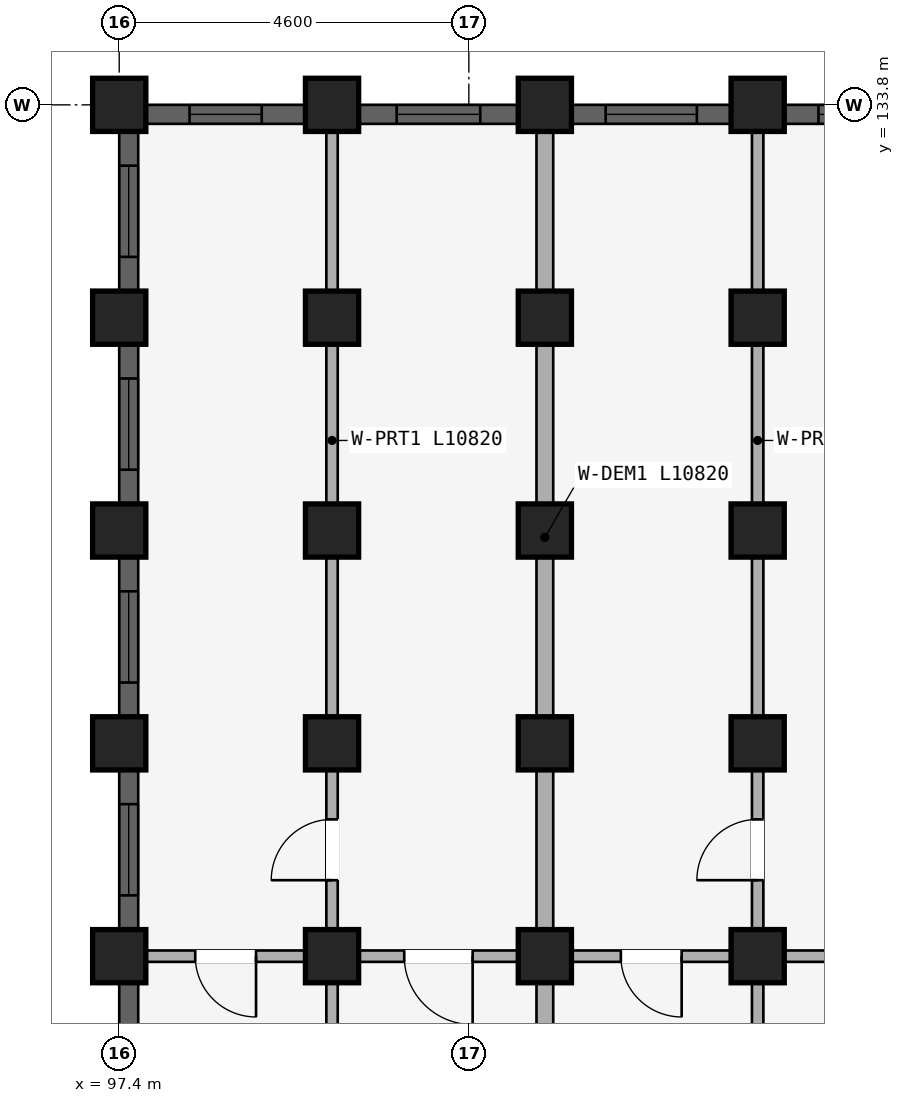
"""IFC4 building model, lengths in metres.
Left out: names, types, materials, properties, quantities, classifications, styles, units other than length and angle.
Written with IfcOpenShell. Run it as: python <this file> out.ifc"""

import sys

from ifc_helpers import new_model, si_unit, direction, frame, frame_2d, origin, origin_2d, place, context, subcontext, project, spatial, rectangle, extrude, element, fill, save


model = new_model("IFC4")
c1 = context("Model", 3, precision=1e-05, world=origin(), true_north=direction((0.0, 1.0)))
c2 = subcontext(c1, "Body", "Model", "MODEL_VIEW")
j1 = project(units=[si_unit("LENGTHUNIT", "METRE"), si_unit("PLANEANGLEUNIT", "RADIAN")], contexts=[c1])
p1 = place(None, origin())
s1 = spatial("IfcSite", under=j1, at=p1, CompositionType="ELEMENT")
p2 = place(p1, origin())
s2 = spatial("IfcBuilding", under=s1, at=p2, CompositionType="ELEMENT")
p3 = place(p2, frame((0.0, 0.0, 18.15)))
s3 = spatial("IfcBuildingStorey", under=s2, at=p3, CompositionType="ELEMENT", Elevation=18.15)
for number, where, z_axis, x_axis in (
    (1, (105.8, 122.6, 0.0), (0.0, 0.0, 1.0), (1.0, 0.0, 0.0)),
    (2, (105.8, 125.4, 0.0), (0.0, 0.0, 1.0), (1.0, 0.0, 0.0)),
    (3, (105.8, 128.2, 0.0), (0.0, 0.0, 1.0), (1.0, 0.0, 0.0)),
    (4, (105.8, 131.0, 0.0), (0.0, 0.0, 1.0), (1.0, 0.0, 0.0)),
    (5, (105.8, 133.8, 0.0), (0.0, 0.0, 1.0), (1.0, 0.0, 0.0)),
    (6, (103.0, 122.6, 0.0), (0.0, 0.0, 1.0), (1.0, 0.0, 0.0)),
    (7, (103.0, 125.4, 0.0), (0.0, 0.0, 1.0), (1.0, 0.0, 0.0)),
    (8, (103.0, 128.2, 0.0), (0.0, 0.0, 1.0), (1.0, 0.0, 0.0)),
    (9, (103.0, 131.0, 0.0), (0.0, 0.0, 1.0), (1.0, 0.0, 0.0)),
    (10, (103.0, 133.8, 0.0), (0.0, 0.0, 1.0), (1.0, 0.0, 0.0)),
    (11, (100.2, 122.6, 0.0), (0.0, 0.0, 1.0), (1.0, 0.0, 0.0)),
    (12, (100.2, 125.4, 0.0), (0.0, 0.0, 1.0), (1.0, 0.0, 0.0)),
    (13, (100.2, 128.2, 0.0), (0.0, 0.0, 1.0), (1.0, 0.0, 0.0)),
    (14, (100.2, 131.0, 0.0), (0.0, 0.0, 1.0), (1.0, 0.0, 0.0)),
    (15, (100.2, 133.8, 0.0), (0.0, 0.0, 1.0), (1.0, 0.0, 0.0)),
    (16, (97.4, 122.6, 0.0), (0.0, 0.0, 1.0), (1.0, 0.0, 0.0)),
    (17, (97.4, 125.4, 0.0), (0.0, 0.0, 1.0), (1.0, 0.0, 0.0)),
    (18, (97.4, 128.2, 0.0), (0.0, 0.0, 1.0), (1.0, 0.0, 0.0)),
    (19, (97.4, 131.0, 0.0), (0.0, 0.0, 1.0), (1.0, 0.0, 0.0)),
    (20, (97.4, 133.8, 0.0), (0.0, 0.0, 1.0), (1.0, 0.0, 0.0)),
):
    element("IfcColumn", number, at=place(p3, frame(where, z_axis=z_axis, x_axis=x_axis)), inside=s3, PredefinedType="COLUMN", context=c2, shape_type="SweptSolid", body=[
        extrude(rectangle(XDim=0.7, YDim=0.7, at=origin_2d()), origin(), (0.0, 0.0, 1.0), 2.93),
    ])
p4 = place(p3, frame((108.52, 122.6, 0.0), z_axis=(0.0, 0.0, 1.0), x_axis=(-1.0, 0.0, 0.0)))
e21 = element("IfcWall", 21, at=p4, inside=s3, PredefinedType="PLUMBINGWALL", context=c2, shape_type="SweptSolid", body=[
    extrude(rectangle(XDim=2.64, YDim=0.15, at=frame_2d((1.32, 0.0))), origin(), (0.0, 0.0, 1.0), 2.372),
])
p5 = place(p4, frame((0.87, 0.0, 0.0)))
e22 = element("IfcOpeningElement", 22, at=p5, cuts=e21, PredefinedType="OPENING", context=c2, shape_type="SweptSolid", body=[
    extrude(rectangle(XDim=0.9, YDim=2.1, at=frame_2d((0.45, 1.05))), frame((0.0, 0.085, 0.0), z_axis=(0.0, -1.0, 0.0), x_axis=(1.0, 0.0, 0.0)), (0.0, 0.0, 1.0), 0.17),
])
p6 = place(p3, frame((105.72, 122.6, 0.0), z_axis=(0.0, 0.0, 1.0), x_axis=(-1.0, 0.0, 0.0)))
e23 = element("IfcWall", 23, at=p6, inside=s3, PredefinedType="PLUMBINGWALL", context=c2, shape_type="SweptSolid", body=[
    extrude(rectangle(XDim=2.64, YDim=0.15, at=frame_2d((1.32, 0.0))), origin(), (0.0, 0.0, 1.0), 2.372),
])
p7 = place(p6, frame((0.92, 0.0, 0.0)))
e24 = element("IfcOpeningElement", 24, at=p7, cuts=e23, PredefinedType="OPENING", context=c2, shape_type="SweptSolid", body=[
    extrude(rectangle(XDim=0.8, YDim=2.1, at=frame_2d((0.4, 1.05))), frame((0.0, 0.085, 0.0), z_axis=(0.0, -1.0, 0.0), x_axis=(1.0, 0.0, 0.0)), (0.0, 0.0, 1.0), 0.17),
])
p8 = place(p3, frame((102.92, 122.6, 0.0), z_axis=(0.0, 0.0, 1.0), x_axis=(-1.0, 0.0, 0.0)))
e25 = element("IfcWall", 25, at=p8, inside=s3, PredefinedType="PLUMBINGWALL", context=c2, shape_type="SweptSolid", body=[
    extrude(rectangle(XDim=2.64, YDim=0.15, at=frame_2d((1.32, 0.0))), origin(), (0.0, 0.0, 1.0), 2.372),
])
p9 = place(p8, frame((0.87, 0.0, 0.0)))
e26 = element("IfcOpeningElement", 26, at=p9, cuts=e25, PredefinedType="OPENING", context=c2, shape_type="SweptSolid", body=[
    extrude(rectangle(XDim=0.9, YDim=2.1, at=frame_2d((0.45, 1.05))), frame((0.0, 0.085, 0.0), z_axis=(0.0, -1.0, 0.0), x_axis=(1.0, 0.0, 0.0)), (0.0, 0.0, 1.0), 0.17),
])
p10 = place(p3, frame((100.12, 122.6, 0.0), z_axis=(0.0, 0.0, 1.0), x_axis=(-1.0, 0.0, 0.0)))
e27 = element("IfcWall", 27, at=p10, inside=s3, PredefinedType="PLUMBINGWALL", context=c2, shape_type="SweptSolid", body=[
    extrude(rectangle(XDim=2.64, YDim=0.15, at=frame_2d((1.32, 0.0))), origin(), (0.0, 0.0, 1.0), 2.372),
])
p11 = place(p10, frame((0.92, 0.0, 0.0)))
e28 = element("IfcOpeningElement", 28, at=p11, cuts=e27, PredefinedType="OPENING", context=c2, shape_type="SweptSolid", body=[
    extrude(rectangle(XDim=0.8, YDim=2.1, at=frame_2d((0.4, 1.05))), frame((0.0, 0.085, 0.0), z_axis=(0.0, -1.0, 0.0), x_axis=(1.0, 0.0, 0.0)), (0.0, 0.0, 1.0), 0.17),
])
p12 = place(p3, frame((105.8, 116.05, 0.0), z_axis=(0.0, 0.0, 1.0), x_axis=(0.0, 1.0, 0.0)))
e29 = element("IfcWall", 29, at=p12, inside=s3, PredefinedType="PARTITIONING", context=c2, shape_type="SweptSolid", body=[
    extrude(rectangle(XDim=6.53, YDim=0.15, at=frame_2d((3.265, 0.0))), origin(), (0.0, 0.0, 1.0), 2.372),
])
p13 = place(p12, frame((2.815, 0.0, 0.0)))
e30 = element("IfcOpeningElement", 30, at=p13, cuts=e29, PredefinedType="OPENING", context=c2, shape_type="SweptSolid", body=[
    extrude(rectangle(XDim=0.9, YDim=2.1, at=frame_2d((0.45, 1.05))), frame((0.0, 0.085, 0.0), z_axis=(0.0, -1.0, 0.0), x_axis=(1.0, 0.0, 0.0)), (0.0, 0.0, 1.0), 0.17),
])
p14 = place(p3, frame((105.8, 122.7, 0.0), z_axis=(0.0, 0.0, 1.0), x_axis=(0.0, 1.0, 0.0)))
e31 = element("IfcWall", 31, at=p14, inside=s3, PredefinedType="PARTITIONING", context=c2, shape_type="SweptSolid", body=[
    extrude(rectangle(XDim=10.82, YDim=0.15, at=frame_2d((5.41, 0.0))), origin(), (0.0, 0.0, 1.0), 2.372),
])
p15 = place(p14, frame((0.899, 0.0, 0.0)))
e32 = element("IfcOpeningElement", 32, at=p15, cuts=e31, PredefinedType="OPENING", context=c2, shape_type="SweptSolid", body=[
    extrude(rectangle(XDim=0.8, YDim=2.1, at=frame_2d((0.4, 1.05))), frame((0.0, 0.085, 0.0), z_axis=(0.0, -1.0, 0.0), x_axis=(1.0, 0.0, 0.0)), (0.0, 0.0, 1.0), 0.17),
])
p16 = place(p3, frame((103.0, 116.05, 0.0), z_axis=(0.0, 0.0, 1.0), x_axis=(0.0, 1.0, 0.0)))
e33 = element("IfcWall", 33, at=p16, inside=s3, PredefinedType="STANDARD", context=c2, shape_type="SweptSolid", body=[
    extrude(rectangle(XDim=6.53, YDim=0.22, at=frame_2d((3.265, 0.0))), origin(), (0.0, 0.0, 1.0), 2.372),
])
p17 = place(p3, frame((103.0, 122.7, 0.0), z_axis=(0.0, 0.0, 1.0), x_axis=(0.0, 1.0, 0.0)))
e34 = element("IfcWall", 34, at=p17, inside=s3, PredefinedType="STANDARD", context=c2, shape_type="SweptSolid", body=[
    extrude(rectangle(XDim=10.82, YDim=0.22, at=frame_2d((5.41, 0.0))), origin(), (0.0, 0.0, 1.0), 2.372),
])
p18 = place(p3, frame((100.2, 116.05, 0.0), z_axis=(0.0, 0.0, 1.0), x_axis=(0.0, 1.0, 0.0)))
e35 = element("IfcWall", 35, at=p18, inside=s3, PredefinedType="PARTITIONING", context=c2, shape_type="SweptSolid", body=[
    extrude(rectangle(XDim=6.53, YDim=0.15, at=frame_2d((3.265, 0.0))), origin(), (0.0, 0.0, 1.0), 2.372),
])
p19 = place(p18, frame((2.815, 0.0, 0.0)))
e36 = element("IfcOpeningElement", 36, at=p19, cuts=e35, PredefinedType="OPENING", context=c2, shape_type="SweptSolid", body=[
    extrude(rectangle(XDim=0.9, YDim=2.1, at=frame_2d((0.45, 1.05))), frame((0.0, 0.085, 0.0), z_axis=(0.0, -1.0, 0.0), x_axis=(1.0, 0.0, 0.0)), (0.0, 0.0, 1.0), 0.17),
])
p20 = place(p3, frame((100.2, 122.7, 0.0), z_axis=(0.0, 0.0, 1.0), x_axis=(0.0, 1.0, 0.0)))
e37 = element("IfcWall", 37, at=p20, inside=s3, PredefinedType="PARTITIONING", context=c2, shape_type="SweptSolid", body=[
    extrude(rectangle(XDim=10.82, YDim=0.15, at=frame_2d((5.41, 0.0))), origin(), (0.0, 0.0, 1.0), 2.372),
])
p21 = place(p20, frame((0.899, 0.0, 0.0)))
e38 = element("IfcOpeningElement", 38, at=p21, cuts=e37, PredefinedType="OPENING", context=c2, shape_type="SweptSolid", body=[
    extrude(rectangle(XDim=0.8, YDim=2.1, at=frame_2d((0.4, 1.05))), frame((0.0, 0.085, 0.0), z_axis=(0.0, -1.0, 0.0), x_axis=(1.0, 0.0, 0.0)), (0.0, 0.0, 1.0), 0.17),
])
p22 = place(p3, frame((108.247, 133.675, 0.0), z_axis=(0.0, 0.0, 1.0), x_axis=(-1.0, 0.0, 0.0)))
e39 = element("IfcWall", 39, at=p22, inside=s3, PredefinedType="STANDARD", context=c2, shape_type="SweptSolid", body=[
    extrude(rectangle(XDim=2.093, YDim=0.25, at=frame_2d((1.046, 0.0))), origin(), (0.0, 0.0, 1.0), 2.472),
])
p23 = place(p22, frame((0.447, 0.0, 0.772)))
e40 = element("IfcOpeningElement", 40, at=p23, cuts=e39, PredefinedType="OPENING", context=c2, shape_type="SweptSolid", body=[
    extrude(rectangle(XDim=1.2, YDim=1.5, at=frame_2d((0.6, 0.75))), frame((0.0, 0.135, 0.0), z_axis=(0.0, -1.0, 0.0), x_axis=(1.0, 0.0, 0.0)), (0.0, 0.0, 1.0), 0.27),
])
p24 = place(p3, frame((105.447, 133.675, 0.0), z_axis=(0.0, 0.0, 1.0), x_axis=(-1.0, 0.0, 0.0)))
e41 = element("IfcWall", 41, at=p24, inside=s3, PredefinedType="STANDARD", context=c2, shape_type="SweptSolid", body=[
    extrude(rectangle(XDim=2.093, YDim=0.25, at=frame_2d((1.046, 0.0))), origin(), (0.0, 0.0, 1.0), 2.472),
])
p25 = place(p24, frame((0.447, 0.0, 0.772)))
e42 = element("IfcOpeningElement", 42, at=p25, cuts=e41, PredefinedType="OPENING", context=c2, shape_type="SweptSolid", body=[
    extrude(rectangle(XDim=1.2, YDim=1.5, at=frame_2d((0.6, 0.75))), frame((0.0, 0.135, 0.0), z_axis=(0.0, -1.0, 0.0), x_axis=(1.0, 0.0, 0.0)), (0.0, 0.0, 1.0), 0.27),
])
p26 = place(p3, frame((102.646, 133.675, 0.0), z_axis=(0.0, 0.0, 1.0), x_axis=(-1.0, 0.0, 0.0)))
e43 = element("IfcWall", 43, at=p26, inside=s3, PredefinedType="STANDARD", context=c2, shape_type="SweptSolid", body=[
    extrude(rectangle(XDim=2.093, YDim=0.25, at=frame_2d((1.046, 0.0))), origin(), (0.0, 0.0, 1.0), 2.472),
])
p27 = place(p26, frame((0.497, 0.0, 0.822)))
e44 = element("IfcOpeningElement", 44, at=p27, cuts=e43, PredefinedType="OPENING", context=c2, shape_type="SweptSolid", body=[
    extrude(rectangle(XDim=1.1, YDim=1.45, at=frame_2d((0.55, 0.725))), frame((0.0, 0.135, 0.0), z_axis=(0.0, -1.0, 0.0), x_axis=(1.0, 0.0, 0.0)), (0.0, 0.0, 1.0), 0.27),
])
p28 = place(p3, frame((99.846, 133.675, 0.0), z_axis=(0.0, 0.0, 1.0), x_axis=(-1.0, 0.0, 0.0)))
e45 = element("IfcWall", 45, at=p28, inside=s3, PredefinedType="STANDARD", context=c2, shape_type="SweptSolid", body=[
    extrude(rectangle(XDim=2.093, YDim=0.25, at=frame_2d((1.046, 0.0))), origin(), (0.0, 0.0, 1.0), 2.472),
])
p29 = place(p28, frame((0.572, 0.0, 0.88)))
e46 = element("IfcOpeningElement", 46, at=p29, cuts=e45, PredefinedType="OPENING", context=c2, shape_type="SweptSolid", body=[
    extrude(rectangle(XDim=0.95, YDim=1.35, at=frame_2d((0.475, 0.675))), frame((0.0, 0.135, 0.0), z_axis=(0.0, -1.0, 0.0), x_axis=(1.0, 0.0, 0.0)), (0.0, 0.0, 1.0), 0.27),
])
p30 = place(p3, frame((97.525, 116.354, 0.0), z_axis=(0.0, 0.0, 1.0), x_axis=(0.0, 1.0, 0.0)))
e47 = element("IfcWall", 47, at=p30, inside=s3, PredefinedType="STANDARD", context=c2, shape_type="SweptSolid", body=[
    extrude(rectangle(XDim=5.893, YDim=0.25, at=frame_2d((2.947, 0.0))), origin(), (0.0, 0.0, 1.0), 2.372),
])
p31 = place(p30, frame((2.197, 0.0, 0.522)))
e48 = element("IfcOpeningElement", 48, at=p31, cuts=e47, PredefinedType="OPENING", context=c2, shape_type="SweptSolid", body=[
    extrude(rectangle(XDim=1.5, YDim=1.65, at=frame_2d((0.75, 0.825))), frame((0.0, 0.135, 0.0), z_axis=(0.0, -1.0, 0.0), x_axis=(1.0, 0.0, 0.0)), (0.0, 0.0, 1.0), 0.27),
])
p32 = place(p3, frame((97.525, 122.954, 0.0), z_axis=(0.0, 0.0, 1.0), x_axis=(0.0, 1.0, 0.0)))
e49 = element("IfcWall", 49, at=p32, inside=s3, PredefinedType="STANDARD", context=c2, shape_type="SweptSolid", body=[
    extrude(rectangle(XDim=2.093, YDim=0.25, at=frame_2d((1.046, 0.0))), origin(), (0.0, 0.0, 1.0), 2.372),
])
p33 = place(p32, frame((0.447, 0.0, 0.672)))
e50 = element("IfcOpeningElement", 50, at=p33, cuts=e49, PredefinedType="OPENING", context=c2, shape_type="SweptSolid", body=[
    extrude(rectangle(XDim=1.2, YDim=1.5, at=frame_2d((0.6, 0.75))), frame((0.0, 0.135, 0.0), z_axis=(0.0, -1.0, 0.0), x_axis=(1.0, 0.0, 0.0)), (0.0, 0.0, 1.0), 0.27),
])
p34 = place(p3, frame((97.525, 125.753, 0.0), z_axis=(0.0, 0.0, 1.0), x_axis=(0.0, 1.0, 0.0)))
e51 = element("IfcWall", 51, at=p34, inside=s3, PredefinedType="STANDARD", context=c2, shape_type="SweptSolid", body=[
    extrude(rectangle(XDim=2.093, YDim=0.25, at=frame_2d((1.046, 0.0))), origin(), (0.0, 0.0, 1.0), 2.372),
])
p35 = place(p34, frame((0.447, 0.0, 0.672)))
e52 = element("IfcOpeningElement", 52, at=p35, cuts=e51, PredefinedType="OPENING", context=c2, shape_type="SweptSolid", body=[
    extrude(rectangle(XDim=1.2, YDim=1.5, at=frame_2d((0.6, 0.75))), frame((0.0, 0.135, 0.0), z_axis=(0.0, -1.0, 0.0), x_axis=(1.0, 0.0, 0.0)), (0.0, 0.0, 1.0), 0.27),
])
p36 = place(p3, frame((97.525, 128.553, 0.0), z_axis=(0.0, 0.0, 1.0), x_axis=(0.0, 1.0, 0.0)))
e53 = element("IfcWall", 53, at=p36, inside=s3, PredefinedType="STANDARD", context=c2, shape_type="SweptSolid", body=[
    extrude(rectangle(XDim=2.093, YDim=0.25, at=frame_2d((1.046, 0.0))), origin(), (0.0, 0.0, 1.0), 2.372),
])
p37 = place(p36, frame((0.447, 0.0, 0.672)))
e54 = element("IfcOpeningElement", 54, at=p37, cuts=e53, PredefinedType="OPENING", context=c2, shape_type="SweptSolid", body=[
    extrude(rectangle(XDim=1.2, YDim=1.5, at=frame_2d((0.6, 0.75))), frame((0.0, 0.135, 0.0), z_axis=(0.0, -1.0, 0.0), x_axis=(1.0, 0.0, 0.0)), (0.0, 0.0, 1.0), 0.27),
])
p38 = place(p3, frame((97.525, 131.354, 0.0), z_axis=(0.0, 0.0, 1.0), x_axis=(0.0, 1.0, 0.0)))
e55 = element("IfcWall", 55, at=p38, inside=s3, PredefinedType="STANDARD", context=c2, shape_type="SweptSolid", body=[
    extrude(rectangle(XDim=2.093, YDim=0.25, at=frame_2d((1.046, 0.0))), origin(), (0.0, 0.0, 1.0), 2.372),
])
p39 = place(p38, frame((0.447, 0.0, 0.672)))
e56 = element("IfcOpeningElement", 56, at=p39, cuts=e55, PredefinedType="OPENING", context=c2, shape_type="SweptSolid", body=[
    extrude(rectangle(XDim=1.2, YDim=1.5, at=frame_2d((0.6, 0.75))), frame((0.0, 0.135, 0.0), z_axis=(0.0, -1.0, 0.0), x_axis=(1.0, 0.0, 0.0)), (0.0, 0.0, 1.0), 0.27),
])
p40 = place(p23, origin())
e57 = element("IfcWindow", 57, at=p40, inside=s3, PartitioningType="SINGLE_PANEL", PredefinedType="WINDOW", context=c2, shape_type="SweptSolid", body=[
    extrude(rectangle(XDim=1.2, YDim=1.5, at=frame_2d((0.6, 0.75))), frame((0.0, 0.03, 0.0), z_axis=(0.0, -1.0, 0.0), x_axis=(1.0, 0.0, 0.0)), (0.0, 0.0, 1.0), 0.06),
])
fill(e40, e57)
p41 = place(p25, origin())
e58 = element("IfcWindow", 58, at=p41, inside=s3, PartitioningType="SINGLE_PANEL", PredefinedType="WINDOW", context=c2, shape_type="SweptSolid", body=[
    extrude(rectangle(XDim=1.2, YDim=1.5, at=frame_2d((0.6, 0.75))), frame((0.0, 0.03, 0.0), z_axis=(0.0, -1.0, 0.0), x_axis=(1.0, 0.0, 0.0)), (0.0, 0.0, 1.0), 0.06),
])
fill(e42, e58)
p42 = place(p27, origin())
e59 = element("IfcWindow", 59, at=p42, inside=s3, PartitioningType="SINGLE_PANEL", PredefinedType="WINDOW", context=c2, shape_type="SweptSolid", body=[
    extrude(rectangle(XDim=1.1, YDim=1.45, at=frame_2d((0.55, 0.725))), frame((0.0, 0.03, 0.0), z_axis=(0.0, -1.0, 0.0), x_axis=(1.0, 0.0, 0.0)), (0.0, 0.0, 1.0), 0.06),
])
fill(e44, e59)
p43 = place(p29, origin())
e60 = element("IfcWindow", 60, at=p43, inside=s3, PartitioningType="SINGLE_PANEL", PredefinedType="WINDOW", context=c2, shape_type="SweptSolid", body=[
    extrude(rectangle(XDim=0.95, YDim=1.35, at=frame_2d((0.475, 0.675))), frame((0.0, 0.03, 0.0), z_axis=(0.0, -1.0, 0.0), x_axis=(1.0, 0.0, 0.0)), (0.0, 0.0, 1.0), 0.06),
])
fill(e46, e60)
p44 = place(p33, origin())
e61 = element("IfcWindow", 61, at=p44, inside=s3, PartitioningType="SINGLE_PANEL", PredefinedType="WINDOW", context=c2, shape_type="SweptSolid", body=[
    extrude(rectangle(XDim=1.2, YDim=1.5, at=frame_2d((0.6, 0.75))), frame((0.0, 0.03, 0.0), z_axis=(0.0, -1.0, 0.0), x_axis=(1.0, 0.0, 0.0)), (0.0, 0.0, 1.0), 0.06),
])
fill(e50, e61)
p45 = place(p35, origin())
e62 = element("IfcWindow", 62, at=p45, inside=s3, PartitioningType="SINGLE_PANEL", PredefinedType="WINDOW", context=c2, shape_type="SweptSolid", body=[
    extrude(rectangle(XDim=1.2, YDim=1.5, at=frame_2d((0.6, 0.75))), frame((0.0, 0.03, 0.0), z_axis=(0.0, -1.0, 0.0), x_axis=(1.0, 0.0, 0.0)), (0.0, 0.0, 1.0), 0.06),
])
fill(e52, e62)
p46 = place(p37, origin())
e63 = element("IfcWindow", 63, at=p46, inside=s3, PartitioningType="SINGLE_PANEL", PredefinedType="WINDOW", context=c2, shape_type="SweptSolid", body=[
    extrude(rectangle(XDim=1.2, YDim=1.5, at=frame_2d((0.6, 0.75))), frame((0.0, 0.03, 0.0), z_axis=(0.0, -1.0, 0.0), x_axis=(1.0, 0.0, 0.0)), (0.0, 0.0, 1.0), 0.06),
])
fill(e54, e63)
p47 = place(p39, origin())
e64 = element("IfcWindow", 64, at=p47, inside=s3, PartitioningType="SINGLE_PANEL", PredefinedType="WINDOW", context=c2, shape_type="SweptSolid", body=[
    extrude(rectangle(XDim=1.2, YDim=1.5, at=frame_2d((0.6, 0.75))), frame((0.0, 0.03, 0.0), z_axis=(0.0, -1.0, 0.0), x_axis=(1.0, 0.0, 0.0)), (0.0, 0.0, 1.0), 0.06),
])
fill(e56, e64)
p48 = place(p7, frame((0.8, 0.0, 0.0), z_axis=(0.0, 0.0, 1.0), x_axis=(-1.0, 0.0, 0.0)))
e65 = element("IfcDoor", 65, at=p48, inside=s3, OperationType="SINGLE_SWING_RIGHT", PredefinedType="DOOR", context=c2, shape_type="SweptSolid", body=[
    extrude(rectangle(XDim=0.8, YDim=2.1, at=frame_2d((0.4, 1.05))), frame((0.0, 0.025, 0.0), z_axis=(0.0, -1.0, 0.0), x_axis=(1.0, 0.0, 0.0)), (0.0, 0.0, 1.0), 0.05),
])
fill(e24, e65)
p49 = place(p9, frame((0.9, 0.0, 0.0), z_axis=(0.0, 0.0, 1.0), x_axis=(-1.0, 0.0, 0.0)))
e66 = element("IfcDoor", 66, at=p49, inside=s3, OperationType="SINGLE_SWING_RIGHT", PredefinedType="DOOR", context=c2, shape_type="SweptSolid", body=[
    extrude(rectangle(XDim=0.9, YDim=2.1, at=frame_2d((0.45, 1.05))), frame((0.0, 0.025, 0.0), z_axis=(0.0, -1.0, 0.0), x_axis=(1.0, 0.0, 0.0)), (0.0, 0.0, 1.0), 0.05),
])
fill(e26, e66)
p50 = place(p11, frame((0.8, 0.0, 0.0), z_axis=(0.0, 0.0, 1.0), x_axis=(-1.0, 0.0, 0.0)))
e67 = element("IfcDoor", 67, at=p50, inside=s3, OperationType="SINGLE_SWING_RIGHT", PredefinedType="DOOR", context=c2, shape_type="SweptSolid", body=[
    extrude(rectangle(XDim=0.8, YDim=2.1, at=frame_2d((0.4, 1.05))), frame((0.0, 0.025, 0.0), z_axis=(0.0, -1.0, 0.0), x_axis=(1.0, 0.0, 0.0)), (0.0, 0.0, 1.0), 0.05),
])
fill(e28, e67)
p51 = place(p15, frame((0.8, 0.0, 0.0), z_axis=(0.0, 0.0, 1.0), x_axis=(-1.0, 0.0, 0.0)))
e68 = element("IfcDoor", 68, at=p51, inside=s3, OperationType="SINGLE_SWING_RIGHT", PredefinedType="DOOR", context=c2, shape_type="SweptSolid", body=[
    extrude(rectangle(XDim=0.8, YDim=2.1, at=frame_2d((0.4, 1.05))), frame((0.0, 0.025, 0.0), z_axis=(0.0, -1.0, 0.0), x_axis=(1.0, 0.0, 0.0)), (0.0, 0.0, 1.0), 0.05),
])
fill(e32, e68)
p52 = place(p21, origin())
e69 = element("IfcDoor", 69, at=p52, inside=s3, OperationType="SINGLE_SWING_LEFT", PredefinedType="DOOR", context=c2, shape_type="SweptSolid", body=[
    extrude(rectangle(XDim=0.8, YDim=2.1, at=frame_2d((0.4, 1.05))), frame((0.0, 0.025, 0.0), z_axis=(0.0, -1.0, 0.0), x_axis=(1.0, 0.0, 0.0)), (0.0, 0.0, 1.0), 0.05),
])
fill(e38, e69)
save(model, sys.argv[1])
